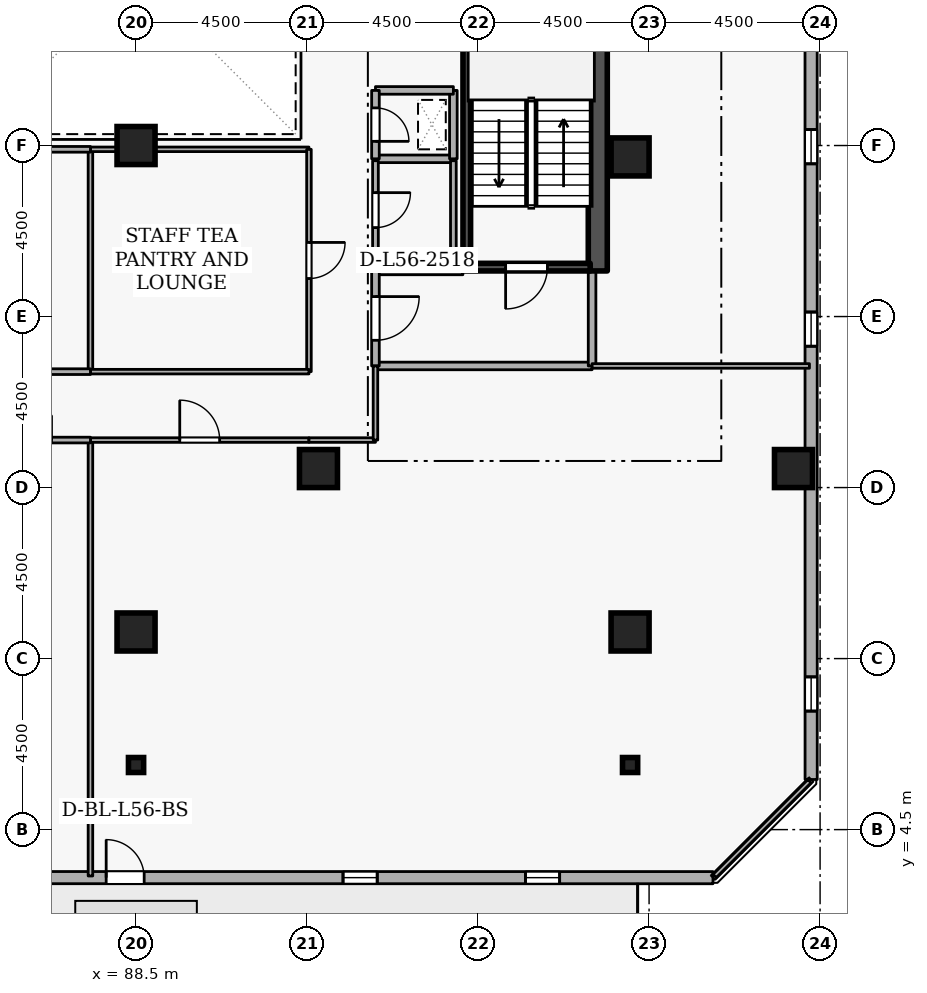
"""IFC4 building model, lengths in metres.
Left out: names, types, materials, properties, quantities, classifications, styles, units other than length and angle.
Written with IfcOpenShell. Run it as: python <this file> out.ifc"""

import sys

from ifc_helpers import new_model, si_unit, direction, frame, frame_2d, origin, origin_2d, place, context, subcontext, project, spatial, rectangle, i_section, extrude, element, fill, save


model = new_model("IFC4")
c1 = context("Model", 3, precision=1e-05, world=origin(), true_north=direction((0.0, 1.0)))
c2 = subcontext(c1, "Body", "Model", "MODEL_VIEW")
j1 = project(units=[si_unit("LENGTHUNIT", "METRE"), si_unit("PLANEANGLEUNIT", "RADIAN")], contexts=[c1])
p1 = place(None, origin())
s1 = spatial("IfcSite", under=j1, at=p1, CompositionType="ELEMENT")
p2 = place(p1, origin())
s2 = spatial("IfcBuilding", under=s1, at=p2, CompositionType="ELEMENT")
p3 = place(p2, frame((0.0, 0.0, 210.9)))
s3 = spatial("IfcBuildingStorey", under=s2, at=p3, CompositionType="ELEMENT", Elevation=210.9)
p4 = place(p3, frame((100.65, 19.2, 0.0), z_axis=(0.0, 0.0, 1.0), x_axis=(0.0, 1.0, 0.0)))
e1 = element("IfcWall", 1, at=p4, inside=s3, PredefinedType="SHEAR", context=c2, shape_type="SweptSolid", body=[
    extrude(rectangle(XDim=15.6, YDim=0.5, at=frame_2d((7.8, 0.0))), origin(), (0.0, 0.0, 1.0), 3.6),
])
for number, where, z_axis, x_axis in (
    (2, (105.8, 14.0, 0.0), (0.0, 0.0, 1.0), (1.0, 0.0, 0.0)),
    (3, (101.5, 9.7, 0.0), (0.0, 0.0, 1.0), (1.0, 0.0, 0.0)),
    (4, (88.5, 9.7, 0.0), (0.0, 0.0, 1.0), (1.0, 0.0, 0.0)),
    (5, (93.3, 14.0, 0.0), (0.0, 0.0, 1.0), (1.0, 0.0, 0.0)),
    (6, (101.5, 22.2, 0.0), (0.0, 0.0, 1.0), (1.0, 0.0, 0.0)),
    (7, (88.5, 22.5, 0.0), (0.0, 0.0, 1.0), (1.0, 0.0, 0.0)),
):
    element("IfcColumn", number, at=place(p3, frame(where, z_axis=z_axis, x_axis=x_axis)), inside=s3, PredefinedType="COLUMN", context=c2, shape_type="SweptSolid", body=[
        extrude(rectangle(XDim=1.0, YDim=1.0, at=origin_2d()), origin(), (0.0, 0.0, 1.0), 3.6),
    ])
for number, where, z_axis, x_axis in (
    (8, (101.5, 6.2, 0.0), (0.0, 0.0, 1.0), (1.0, 0.0, 0.0)),
    (9, (88.5, 6.2, 0.0), (0.0, 0.0, 1.0), (1.0, 0.0, 0.0)),
):
    element("IfcColumn", number, at=place(p3, frame(where, z_axis=z_axis, x_axis=x_axis)), inside=s3, PredefinedType="COLUMN", context=c2, shape_type="SweptSolid", body=[
        extrude(i_section(OverallWidth=0.399, OverallDepth=0.394, WebThickness=0.023, FlangeThickness=0.037, FilletRadius=0.015, at=origin_2d()), origin(), (0.0, 0.0, 1.0), 3.6),
    ])
p5 = place(p3, frame((68.146, 3.238, 0.0), z_axis=(0.0, 0.0, 1.0), x_axis=(0.999999997144, -7.5574884e-05, 0.0)))
e10 = element("IfcWall", 10, at=p5, inside=s3, PredefinedType="STANDARD", context=c2, shape_type="SweptSolid", body=[
    extrude(rectangle(XDim=35.535, YDim=0.32, at=frame_2d((17.768, 0.0))), origin(), (0.0, 0.0, 1.0), 2.7),
])
p6 = place(p5, frame((19.567, 0.0, 0.0)))
e11 = element("IfcOpeningElement", 11, at=p6, cuts=e10, PredefinedType="OPENING", context=c2, shape_type="SweptSolid", body=[
    extrude(rectangle(XDim=1.0, YDim=2.08, at=frame_2d((0.5, 1.04))), frame((0.0, 0.17, 0.0), z_axis=(0.0, -1.0, 0.0), x_axis=(1.0, 0.0, 0.0)), (0.0, 0.0, 1.0), 0.34),
])
p7 = place(p5, frame((1.8, 0.0, 0.72)))
e12 = element("IfcOpeningElement", 12, at=p7, cuts=e10, PredefinedType="OPENING", context=c2, shape_type="SweptSolid", body=[
    extrude(rectangle(XDim=0.9, YDim=1.75, at=frame_2d((0.45, 0.875))), frame((0.0, 0.17, 0.0), z_axis=(0.0, -1.0, 0.0), x_axis=(1.0, 0.0, 0.0)), (0.0, 0.0, 1.0), 0.34),
])
p8 = place(p5, frame((6.6, 0.0, 0.72)))
e13 = element("IfcOpeningElement", 13, at=p8, cuts=e10, PredefinedType="OPENING", context=c2, shape_type="SweptSolid", body=[
    extrude(rectangle(XDim=0.9, YDim=1.75, at=frame_2d((0.45, 0.875))), frame((0.0, 0.17, 0.0), z_axis=(0.0, -1.0, 0.0), x_axis=(1.0, 0.0, 0.0)), (0.0, 0.0, 1.0), 0.34),
])
p9 = place(p5, frame((11.4, 0.0, 0.72)))
e14 = element("IfcOpeningElement", 14, at=p9, cuts=e10, PredefinedType="OPENING", context=c2, shape_type="SweptSolid", body=[
    extrude(rectangle(XDim=0.9, YDim=1.75, at=frame_2d((0.45, 0.875))), frame((0.0, 0.17, 0.0), z_axis=(0.0, -1.0, 0.0), x_axis=(1.0, 0.0, 0.0)), (0.0, 0.0, 1.0), 0.34),
])
p10 = place(p5, frame((16.2, 0.0, 0.72)))
e15 = element("IfcOpeningElement", 15, at=p10, cuts=e10, PredefinedType="OPENING", context=c2, shape_type="SweptSolid", body=[
    extrude(rectangle(XDim=0.9, YDim=1.75, at=frame_2d((0.45, 0.875))), frame((0.0, 0.17, 0.0), z_axis=(0.0, -1.0, 0.0), x_axis=(1.0, 0.0, 0.0)), (0.0, 0.0, 1.0), 0.34),
])
p11 = place(p5, frame((25.8, 0.0, 0.72)))
e16 = element("IfcOpeningElement", 16, at=p11, cuts=e10, PredefinedType="OPENING", context=c2, shape_type="SweptSolid", body=[
    extrude(rectangle(XDim=0.9, YDim=1.75, at=frame_2d((0.45, 0.875))), frame((0.0, 0.17, 0.0), z_axis=(0.0, -1.0, 0.0), x_axis=(1.0, 0.0, 0.0)), (0.0, 0.0, 1.0), 0.34),
])
p12 = place(p5, frame((30.6, 0.0, 0.72)))
e17 = element("IfcOpeningElement", 17, at=p12, cuts=e10, PredefinedType="OPENING", context=c2, shape_type="SweptSolid", body=[
    extrude(rectangle(XDim=0.9, YDim=1.75, at=frame_2d((0.45, 0.875))), frame((0.0, 0.17, 0.0), z_axis=(0.0, -1.0, 0.0), x_axis=(1.0, 0.0, 0.0)), (0.0, 0.0, 1.0), 0.34),
])
p13 = place(p3, frame((106.265, 5.819, 0.0), z_axis=(0.0, 0.0, 1.0), x_axis=(-7.5574884e-05, 0.999999997144, 0.0)))
e18 = element("IfcWall", 18, at=p13, inside=s3, PredefinedType="STANDARD", context=c2, shape_type="SweptSolid", body=[
    extrude(rectangle(XDim=35.535, YDim=0.32, at=frame_2d((17.768, 0.0))), origin(), (0.0, 0.0, 1.0), 2.7),
])
p14 = place(p13, frame((1.8, 0.0, 0.72)))
e19 = element("IfcOpeningElement", 19, at=p14, cuts=e18, PredefinedType="OPENING", context=c2, shape_type="SweptSolid", body=[
    extrude(rectangle(XDim=0.9, YDim=1.75, at=frame_2d((0.45, 0.875))), frame((0.0, 0.17, 0.0), z_axis=(0.0, -1.0, 0.0), x_axis=(1.0, 0.0, 0.0)), (0.0, 0.0, 1.0), 0.34),
])
p15 = place(p13, frame((11.4, 0.0, 0.72)))
e20 = element("IfcOpeningElement", 20, at=p15, cuts=e18, PredefinedType="OPENING", context=c2, shape_type="SweptSolid", body=[
    extrude(rectangle(XDim=0.9, YDim=1.75, at=frame_2d((0.45, 0.875))), frame((0.0, 0.17, 0.0), z_axis=(0.0, -1.0, 0.0), x_axis=(1.0, 0.0, 0.0)), (0.0, 0.0, 1.0), 0.34),
])
p16 = place(p13, frame((16.2, 0.0, 0.72)))
e21 = element("IfcOpeningElement", 21, at=p16, cuts=e18, PredefinedType="OPENING", context=c2, shape_type="SweptSolid", body=[
    extrude(rectangle(XDim=0.9, YDim=1.75, at=frame_2d((0.45, 0.875))), frame((0.0, 0.17, 0.0), z_axis=(0.0, -1.0, 0.0), x_axis=(1.0, 0.0, 0.0)), (0.0, 0.0, 1.0), 0.34),
])
p17 = place(p13, frame((25.8, 0.0, 0.72)))
e22 = element("IfcOpeningElement", 22, at=p17, cuts=e18, PredefinedType="OPENING", context=c2, shape_type="SweptSolid", body=[
    extrude(rectangle(XDim=0.9, YDim=1.75, at=frame_2d((0.45, 0.875))), frame((0.0, 0.17, 0.0), z_axis=(0.0, -1.0, 0.0), x_axis=(1.0, 0.0, 0.0)), (0.0, 0.0, 1.0), 0.34),
])
p18 = place(p3, frame((100.45, 19.3, 0.0), z_axis=(0.0, 0.0, 1.0), x_axis=(-1.0, 0.0, 0.0)))
e23 = element("IfcWall", 23, at=p18, inside=s3, PredefinedType="SHEAR", context=c2, shape_type="SweptSolid", body=[
    extrude(rectangle(XDim=3.35, YDim=0.2, at=frame_2d((1.675, 0.0))), origin(), (0.0, 0.0, 1.0), 3.6),
])
p19 = place(p18, frame((1.125, 0.0, 0.0)))
e24 = element("IfcOpeningElement", 24, at=p19, cuts=e23, PredefinedType="OPENING", context=c2, shape_type="SweptSolid", body=[
    extrude(rectangle(XDim=1.1, YDim=2.1, at=frame_2d((0.55, 1.05))), frame((0.0, 0.11, 0.0), z_axis=(0.0, -1.0, 0.0), x_axis=(1.0, 0.0, 0.0)), (0.0, 0.0, 1.0), 0.22),
])
p20 = place(p3, frame((97.203, 26.55, 0.0), z_axis=(0.0, 0.0, 1.0), x_axis=(0.0, -1.0, 0.0)))
e25 = element("IfcWall", 25, at=p20, inside=s3, PredefinedType="SHEAR", context=c2, shape_type="SweptSolid", body=[
    extrude(rectangle(XDim=7.1, YDim=0.2, at=frame_2d((3.55, 0.0))), origin(), (0.0, 0.0, 1.0), 3.6),
])
p21 = place(p3, frame((94.8, 16.7, 0.0), z_axis=(0.0, 0.0, 1.0), x_axis=(1.0, 0.0, 0.0)))
e26 = element("IfcWall", 26, at=p21, inside=s3, PredefinedType="STANDARD", context=c2, shape_type="SweptSolid", body=[
    extrude(rectangle(XDim=5.7, YDim=0.2, at=frame_2d((2.85, 0.0))), origin(), (0.0, 0.0, 1.0), 3.34),
])
p22 = place(p3, frame((100.5, 16.7, 0.0), z_axis=(0.0, 0.0, 1.0), x_axis=(0.0, 1.0, 0.0)))
e27 = element("IfcWall", 27, at=p22, inside=s3, PredefinedType="STANDARD", context=c2, shape_type="SweptSolid", body=[
    extrude(rectangle(XDim=2.5, YDim=0.2, at=frame_2d((1.25, 0.0))), origin(), (0.0, 0.0, 1.0), 3.34),
])
p23 = place(p3, frame((97.1, 19.2, 0.0), z_axis=(0.0, 0.0, 1.0), x_axis=(-1.0, 0.0, 0.0)))
e28 = element("IfcWall", 28, at=p23, inside=s3, PredefinedType="STANDARD", context=c2, shape_type="SweptSolid", body=[
    extrude(rectangle(XDim=2.3, YDim=0.2, at=frame_2d((1.15, 0.0))), origin(), (0.0, 0.0, 1.0), 2.545),
])
p24 = place(p3, frame((94.8, 19.2, 0.0), z_axis=(0.0, 0.0, 1.0), x_axis=(0.0, -1.0, 0.0)))
e29 = element("IfcWall", 29, at=p24, inside=s3, PredefinedType="STANDARD", context=c2, shape_type="SweptSolid", body=[
    extrude(rectangle(XDim=2.5, YDim=0.2, at=frame_2d((1.25, 0.0))), origin(), (0.0, 0.0, 1.0), 3.34),
])
p25 = place(p24, frame((0.675, 0.0, 0.0)))
e30 = element("IfcOpeningElement", 30, at=p25, cuts=e29, PredefinedType="OPENING", context=c2, shape_type="SweptSolid", body=[
    extrude(rectangle(XDim=1.15, YDim=2.1, at=frame_2d((0.575, 1.05))), frame((0.0, 0.11, 0.0), z_axis=(0.0, -1.0, 0.0), x_axis=(1.0, 0.0, 0.0)), (0.0, 0.0, 1.0), 0.22),
])
p26 = place(p3, frame((94.8, 22.15, 0.0), z_axis=(0.0, 0.0, 1.0), x_axis=(1.0, 0.0, 0.0)))
e31 = element("IfcWall", 31, at=p26, inside=s3, PredefinedType="STANDARD", context=c2, shape_type="SweptSolid", body=[
    extrude(rectangle(XDim=2.05, YDim=0.2, at=frame_2d((1.025, 0.0))), origin(), (0.0, 0.0, 1.0), 3.34),
])
p27 = place(p3, frame((96.85, 22.15, 0.0), z_axis=(0.0, 0.0, 1.0), x_axis=(0.0, 1.0, 0.0)))
e32 = element("IfcWall", 32, at=p27, inside=s3, PredefinedType="STANDARD", context=c2, shape_type="SweptSolid", body=[
    extrude(rectangle(XDim=1.8, YDim=0.2, at=frame_2d((0.9, 0.0))), origin(), (0.0, 0.0, 1.0), 3.34),
])
p28 = place(p3, frame((96.85, 23.95, 0.0), z_axis=(0.0, 0.0, 1.0), x_axis=(-1.0, 0.0, 0.0)))
e33 = element("IfcWall", 33, at=p28, inside=s3, PredefinedType="STANDARD", context=c2, shape_type="SweptSolid", body=[
    extrude(rectangle(XDim=2.05, YDim=0.2, at=frame_2d((1.025, 0.0))), origin(), (0.0, 0.0, 1.0), 3.34),
])
p29 = place(p3, frame((94.8, 23.95, 0.0), z_axis=(0.0, 0.0, 1.0), x_axis=(0.0, -1.0, 0.0)))
e34 = element("IfcWall", 34, at=p29, inside=s3, PredefinedType="STANDARD", context=c2, shape_type="SweptSolid", body=[
    extrude(rectangle(XDim=1.8, YDim=0.2, at=frame_2d((0.9, 0.0))), origin(), (0.0, 0.0, 1.0), 3.34),
])
p30 = place(p29, frame((0.46, 0.0, 0.0)))
e35 = element("IfcOpeningElement", 35, at=p30, cuts=e34, PredefinedType="OPENING", context=c2, shape_type="SweptSolid", body=[
    extrude(rectangle(XDim=0.88, YDim=2.04, at=frame_2d((0.44, 1.02))), frame((0.0, 0.11, 0.0), z_axis=(0.0, -1.0, 0.0), x_axis=(1.0, 0.0, 0.0)), (0.0, 0.0, 1.0), 0.22),
])
p31 = place(p3, frame((94.8, 19.5, 0.0), z_axis=(0.0, 0.0, 1.0), x_axis=(1.0, 0.0, 0.0)))
e36 = element("IfcWall", 36, at=p31, inside=s3, PredefinedType="PARTITIONING", context=c2, shape_type="SweptSolid", body=[
    extrude(rectangle(XDim=2.05, YDim=0.15, at=frame_2d((1.025, 0.0))), origin(), (0.0, 0.0, 1.0), 2.545),
])
p32 = place(p3, frame((96.85, 19.5, 0.0), z_axis=(0.0, 0.0, 1.0), x_axis=(0.0, 1.0, 0.0)))
e37 = element("IfcWall", 37, at=p32, inside=s3, PredefinedType="PARTITIONING", context=c2, shape_type="SweptSolid", body=[
    extrude(rectangle(XDim=2.6, YDim=0.15, at=frame_2d((1.3, 0.0))), origin(), (0.0, 0.0, 1.0), 3.34),
])
p33 = place(p3, frame((94.8, 22.1, 0.0), z_axis=(0.0, 0.0, 1.0), x_axis=(0.0, -1.0, 0.0)))
e38 = element("IfcWall", 38, at=p33, inside=s3, PredefinedType="PARTITIONING", context=c2, shape_type="SweptSolid", body=[
    extrude(rectangle(XDim=2.6, YDim=0.15, at=frame_2d((1.3, 0.0))), origin(), (0.0, 0.0, 1.0), 3.34),
])
p34 = place(p33, frame((0.84, 0.0, 0.0)))
e39 = element("IfcOpeningElement", 39, at=p34, cuts=e38, PredefinedType="OPENING", context=c2, shape_type="SweptSolid", body=[
    extrude(rectangle(XDim=0.92, YDim=2.08, at=frame_2d((0.46, 1.04))), frame((0.0, 0.085, 0.0), z_axis=(0.0, -1.0, 0.0), x_axis=(1.0, 0.0, 0.0)), (0.0, 0.0, 1.0), 0.17),
])
p35 = place(p3, frame((87.3, 3.28, 0.0), z_axis=(0.0, 0.0, 1.0), x_axis=(0.0, 1.0, 0.0)))
e40 = element("IfcWall", 40, at=p35, inside=s3, PredefinedType="PARTITIONING", context=c2, shape_type="SweptSolid", body=[
    extrude(rectangle(XDim=11.47, YDim=0.12, at=frame_2d((5.735, 0.0))), origin(), (0.0, 0.0, 1.0), 3.34),
])
p36 = place(p3, frame((87.3, 14.75, 0.0), z_axis=(0.0, 0.0, 1.0), x_axis=(1.0, 0.0, 0.0)))
e41 = element("IfcWall", 41, at=p36, inside=s3, PredefinedType="PARTITIONING", context=c2, shape_type="SweptSolid", body=[
    extrude(rectangle(XDim=5.75, YDim=0.12, at=frame_2d((2.875, 0.0))), origin(), (0.0, 0.0, 1.0), 3.34),
])
p37 = place(p36, frame((2.35, 0.0, 0.0)))
e42 = element("IfcOpeningElement", 42, at=p37, cuts=e41, PredefinedType="OPENING", context=c2, shape_type="SweptSolid", body=[
    extrude(rectangle(XDim=1.05, YDim=2.1, at=frame_2d((0.525, 1.05))), frame((0.0, 0.07, 0.0), z_axis=(0.0, -1.0, 0.0), x_axis=(1.0, 0.0, 0.0)), (0.0, 0.0, 1.0), 0.14),
])
p38 = place(p3, frame((93.05, 14.75, 0.0), z_axis=(0.0, 0.0, 1.0), x_axis=(1.0, 0.0, 0.0)))
e43 = element("IfcWall", 43, at=p38, inside=s3, PredefinedType="PARTITIONING", context=c2, shape_type="SweptSolid", body=[
    extrude(rectangle(XDim=1.75, YDim=0.12, at=frame_2d((0.875, 0.0))), origin(), (0.0, 0.0, 1.0), 3.34),
])
p39 = place(p3, frame((94.8, 14.75, 0.0), z_axis=(0.0, 0.0, 1.0), x_axis=(0.0, 1.0, 0.0)))
e44 = element("IfcWall", 44, at=p39, inside=s3, PredefinedType="PARTITIONING", context=c2, shape_type="SweptSolid", body=[
    extrude(rectangle(XDim=1.95, YDim=0.12, at=frame_2d((0.975, 0.0))), origin(), (0.0, 0.0, 1.0), 3.34),
])
p40 = place(p3, frame((100.5, 16.7, 0.0), z_axis=(0.0, 0.0, 1.0), x_axis=(1.0, 0.0, 0.0)))
e45 = element("IfcWall", 45, at=p40, inside=s3, PredefinedType="PARTITIONING", context=c2, shape_type="SweptSolid", body=[
    extrude(rectangle(XDim=5.72, YDim=0.12, at=frame_2d((2.86, 0.0))), origin(), (0.0, 0.0, 1.0), 3.34),
])
p41 = place(p3, frame((106.22, 5.775, 0.0), z_axis=(0.0, 0.0, 1.0), x_axis=(-0.707106781187, -0.707106781187, 0.0)))
e46 = element("IfcWall", 46, at=p41, inside=s3, PredefinedType="PARTITIONING", context=c2, shape_type="SweptSolid", body=[
    extrude(rectangle(XDim=3.528, YDim=0.12, at=frame_2d((1.764, 0.0))), origin(), (0.0, 0.0, 1.0), 3.34),
])
p42 = place(p3, frame((83.95, 14.75, 0.0), z_axis=(0.0, 0.0, 1.0), x_axis=(1.0, 0.0, 0.0)))
e47 = element("IfcWall", 47, at=p42, inside=s3, PredefinedType="PARTITIONING", context=c2, shape_type="SweptSolid", body=[
    extrude(rectangle(XDim=3.35, YDim=0.15, at=frame_2d((1.675, 0.0))), origin(), (0.0, 0.0, 1.0), 3.34),
])
p43 = place(p42, frame((1.025, 0.0, 0.0)))
e48 = element("IfcOpeningElement", 48, at=p43, cuts=e47, PredefinedType="OPENING", context=c2, shape_type="SweptSolid", body=[
    extrude(rectangle(XDim=1.3, YDim=2.12, at=frame_2d((0.65, 1.06))), frame((0.0, 0.085, 0.0), z_axis=(0.0, -1.0, 0.0), x_axis=(1.0, 0.0, 0.0)), (0.0, 0.0, 1.0), 0.17),
])
p44 = place(p3, frame((87.3, 16.55, 0.0), z_axis=(0.0, 0.0, 1.0), x_axis=(0.0, 1.0, 0.0)))
e49 = element("IfcWall", 49, at=p44, inside=s3, PredefinedType="PARTITIONING", context=c2, shape_type="SweptSolid", body=[
    extrude(rectangle(XDim=5.85, YDim=0.12, at=frame_2d((2.925, 0.0))), origin(), (0.0, 0.0, 1.0), 3.34),
])
p45 = place(p3, frame((87.3, 22.4, 0.0), z_axis=(0.0, 0.0, 1.0), x_axis=(1.0, 0.0, 0.0)))
e50 = element("IfcWall", 50, at=p45, inside=s3, PredefinedType="PARTITIONING", context=c2, shape_type="SweptSolid", body=[
    extrude(rectangle(XDim=5.75, YDim=0.12, at=frame_2d((2.875, 0.0))), origin(), (0.0, 0.0, 1.0), 3.34),
])
p46 = place(p3, frame((93.05, 22.4, 0.0), z_axis=(0.0, 0.0, 1.0), x_axis=(0.0, -1.0, 0.0)))
e51 = element("IfcWall", 51, at=p46, inside=s3, PredefinedType="PARTITIONING", context=c2, shape_type="SweptSolid", body=[
    extrude(rectangle(XDim=5.85, YDim=0.12, at=frame_2d((2.925, 0.0))), origin(), (0.0, 0.0, 1.0), 3.34),
])
p47 = place(p46, frame((2.45, 0.0, 0.0)))
e52 = element("IfcOpeningElement", 52, at=p47, cuts=e51, PredefinedType="OPENING", context=c2, shape_type="SweptSolid", body=[
    extrude(rectangle(XDim=0.95, YDim=2.1, at=frame_2d((0.475, 1.05))), frame((0.0, 0.07, 0.0), z_axis=(0.0, -1.0, 0.0), x_axis=(1.0, 0.0, 0.0)), (0.0, 0.0, 1.0), 0.14),
])
p48 = place(p3, frame((93.05, 16.55, 0.0), z_axis=(0.0, 0.0, 1.0), x_axis=(-1.0, 0.0, 0.0)))
e53 = element("IfcWall", 53, at=p48, inside=s3, PredefinedType="PARTITIONING", context=c2, shape_type="SweptSolid", body=[
    extrude(rectangle(XDim=5.75, YDim=0.12, at=frame_2d((2.875, 0.0))), origin(), (0.0, 0.0, 1.0), 3.34),
])
for number, where, z_axis, x_axis in (
    (54, (83.95, 22.4, 0.0), (0.0, 0.0, 1.0), (1.0, 0.0, 0.0)),
    (55, (87.3, 16.55, 0.0), (0.0, 0.0, 1.0), (-1.0, 0.0, 0.0)),
):
    element("IfcWall", number, at=place(p3, frame(where, z_axis=z_axis, x_axis=x_axis)), inside=s3, PredefinedType="PARTITIONING", context=c2, shape_type="SweptSolid", body=[
        extrude(rectangle(XDim=3.35, YDim=0.15, at=frame_2d((1.675, 0.0))), origin(), (0.0, 0.0, 1.0), 3.34),
    ])
p49 = place(p6, origin())
e56 = element("IfcDoor", 56, at=p49, inside=s3, OperationType="SINGLE_SWING_LEFT", PredefinedType="DOOR", context=c2, shape_type="SweptSolid", body=[
    extrude(rectangle(XDim=1.0, YDim=2.08, at=frame_2d((0.5, 1.04))), frame((0.0, 0.025, 0.0), z_axis=(0.0, -1.0, 0.0), x_axis=(1.0, 0.0, 0.0)), (0.0, 0.0, 1.0), 0.05),
])
fill(e11, e56)
p50 = place(p11, origin())
e57 = element("IfcWindow", 57, at=p50, inside=s3, PartitioningType="SINGLE_PANEL", PredefinedType="WINDOW", context=c2, shape_type="SweptSolid", body=[
    extrude(rectangle(XDim=0.9, YDim=1.75, at=frame_2d((0.45, 0.875))), frame((0.0, 0.03, 0.0), z_axis=(0.0, -1.0, 0.0), x_axis=(1.0, 0.0, 0.0)), (0.0, 0.0, 1.0), 0.06),
])
fill(e16, e57)
p51 = place(p12, origin())
e58 = element("IfcWindow", 58, at=p51, inside=s3, PartitioningType="SINGLE_PANEL", PredefinedType="WINDOW", context=c2, shape_type="SweptSolid", body=[
    extrude(rectangle(XDim=0.9, YDim=1.75, at=frame_2d((0.45, 0.875))), frame((0.0, 0.03, 0.0), z_axis=(0.0, -1.0, 0.0), x_axis=(1.0, 0.0, 0.0)), (0.0, 0.0, 1.0), 0.06),
])
fill(e17, e58)
p52 = place(p14, origin())
e59 = element("IfcWindow", 59, at=p52, inside=s3, PartitioningType="SINGLE_PANEL", PredefinedType="WINDOW", context=c2, shape_type="SweptSolid", body=[
    extrude(rectangle(XDim=0.9, YDim=1.75, at=frame_2d((0.45, 0.875))), frame((0.0, 0.03, 0.0), z_axis=(0.0, -1.0, 0.0), x_axis=(1.0, 0.0, 0.0)), (0.0, 0.0, 1.0), 0.06),
])
fill(e19, e59)
p53 = place(p15, origin())
e60 = element("IfcWindow", 60, at=p53, inside=s3, PartitioningType="SINGLE_PANEL", PredefinedType="WINDOW", context=c2, shape_type="SweptSolid", body=[
    extrude(rectangle(XDim=0.9, YDim=1.75, at=frame_2d((0.45, 0.875))), frame((0.0, 0.03, 0.0), z_axis=(0.0, -1.0, 0.0), x_axis=(1.0, 0.0, 0.0)), (0.0, 0.0, 1.0), 0.06),
])
fill(e20, e60)
p54 = place(p16, origin())
e61 = element("IfcWindow", 61, at=p54, inside=s3, PartitioningType="SINGLE_PANEL", PredefinedType="WINDOW", context=c2, shape_type="SweptSolid", body=[
    extrude(rectangle(XDim=0.9, YDim=1.75, at=frame_2d((0.45, 0.875))), frame((0.0, 0.03, 0.0), z_axis=(0.0, -1.0, 0.0), x_axis=(1.0, 0.0, 0.0)), (0.0, 0.0, 1.0), 0.06),
])
fill(e21, e61)
p55 = place(p19, origin())
e62 = element("IfcDoor", 62, at=p55, inside=s3, OperationType="SINGLE_SWING_RIGHT", PredefinedType="DOOR", context=c2, shape_type="SweptSolid", body=[
    extrude(rectangle(XDim=1.1, YDim=2.1, at=frame_2d((0.55, 1.05))), frame((0.0, 0.025, 0.0), z_axis=(0.0, -1.0, 0.0), x_axis=(1.0, 0.0, 0.0)), (0.0, 0.0, 1.0), 0.05),
])
fill(e24, e62)
p56 = place(p25, origin())
e63 = element("IfcDoor", 63, at=p56, inside=s3, OperationType="SINGLE_SWING_LEFT", PredefinedType="DOOR", context=c2, shape_type="SweptSolid", body=[
    extrude(rectangle(XDim=1.15, YDim=2.1, at=frame_2d((0.575, 1.05))), frame((0.0, 0.025, 0.0), z_axis=(0.0, -1.0, 0.0), x_axis=(1.0, 0.0, 0.0)), (0.0, 0.0, 1.0), 0.05),
])
fill(e30, e63)
p57 = place(p30, origin())
e64 = element("IfcDoor", 64, at=p57, inside=s3, OperationType="SINGLE_SWING_RIGHT", PredefinedType="DOOR", context=c2, shape_type="SweptSolid", body=[
    extrude(rectangle(XDim=0.88, YDim=2.04, at=frame_2d((0.44, 1.02))), frame((0.0, 0.025, 0.0), z_axis=(0.0, -1.0, 0.0), x_axis=(1.0, 0.0, 0.0)), (0.0, 0.0, 1.0), 0.05),
])
fill(e35, e64)
p58 = place(p34, origin())
e65 = element("IfcDoor", 65, at=p58, inside=s3, OperationType="SINGLE_SWING_LEFT", PredefinedType="DOOR", context=c2, shape_type="SweptSolid", body=[
    extrude(rectangle(XDim=0.92, YDim=2.08, at=frame_2d((0.46, 1.04))), frame((0.0, 0.025, 0.0), z_axis=(0.0, -1.0, 0.0), x_axis=(1.0, 0.0, 0.0)), (0.0, 0.0, 1.0), 0.05),
])
fill(e39, e65)
p59 = place(p37, origin())
e66 = element("IfcDoor", 66, at=p59, inside=s3, OperationType="SINGLE_SWING_LEFT", PredefinedType="DOOR", context=c2, shape_type="SweptSolid", body=[
    extrude(rectangle(XDim=1.05, YDim=2.1, at=frame_2d((0.525, 1.05))), frame((0.0, 0.025, 0.0), z_axis=(0.0, -1.0, 0.0), x_axis=(1.0, 0.0, 0.0)), (0.0, 0.0, 1.0), 0.05),
])
fill(e42, e66)
p60 = place(p47, origin())
e67 = element("IfcDoor", 67, at=p60, inside=s3, OperationType="SINGLE_SWING_LEFT", PredefinedType="DOOR", context=c2, shape_type="SweptSolid", body=[
    extrude(rectangle(XDim=0.95, YDim=2.1, at=frame_2d((0.475, 1.05))), frame((0.0, 0.025, 0.0), z_axis=(0.0, -1.0, 0.0), x_axis=(1.0, 0.0, 0.0)), (0.0, 0.0, 1.0), 0.05),
])
fill(e52, e67)
save(model, sys.argv[1])
